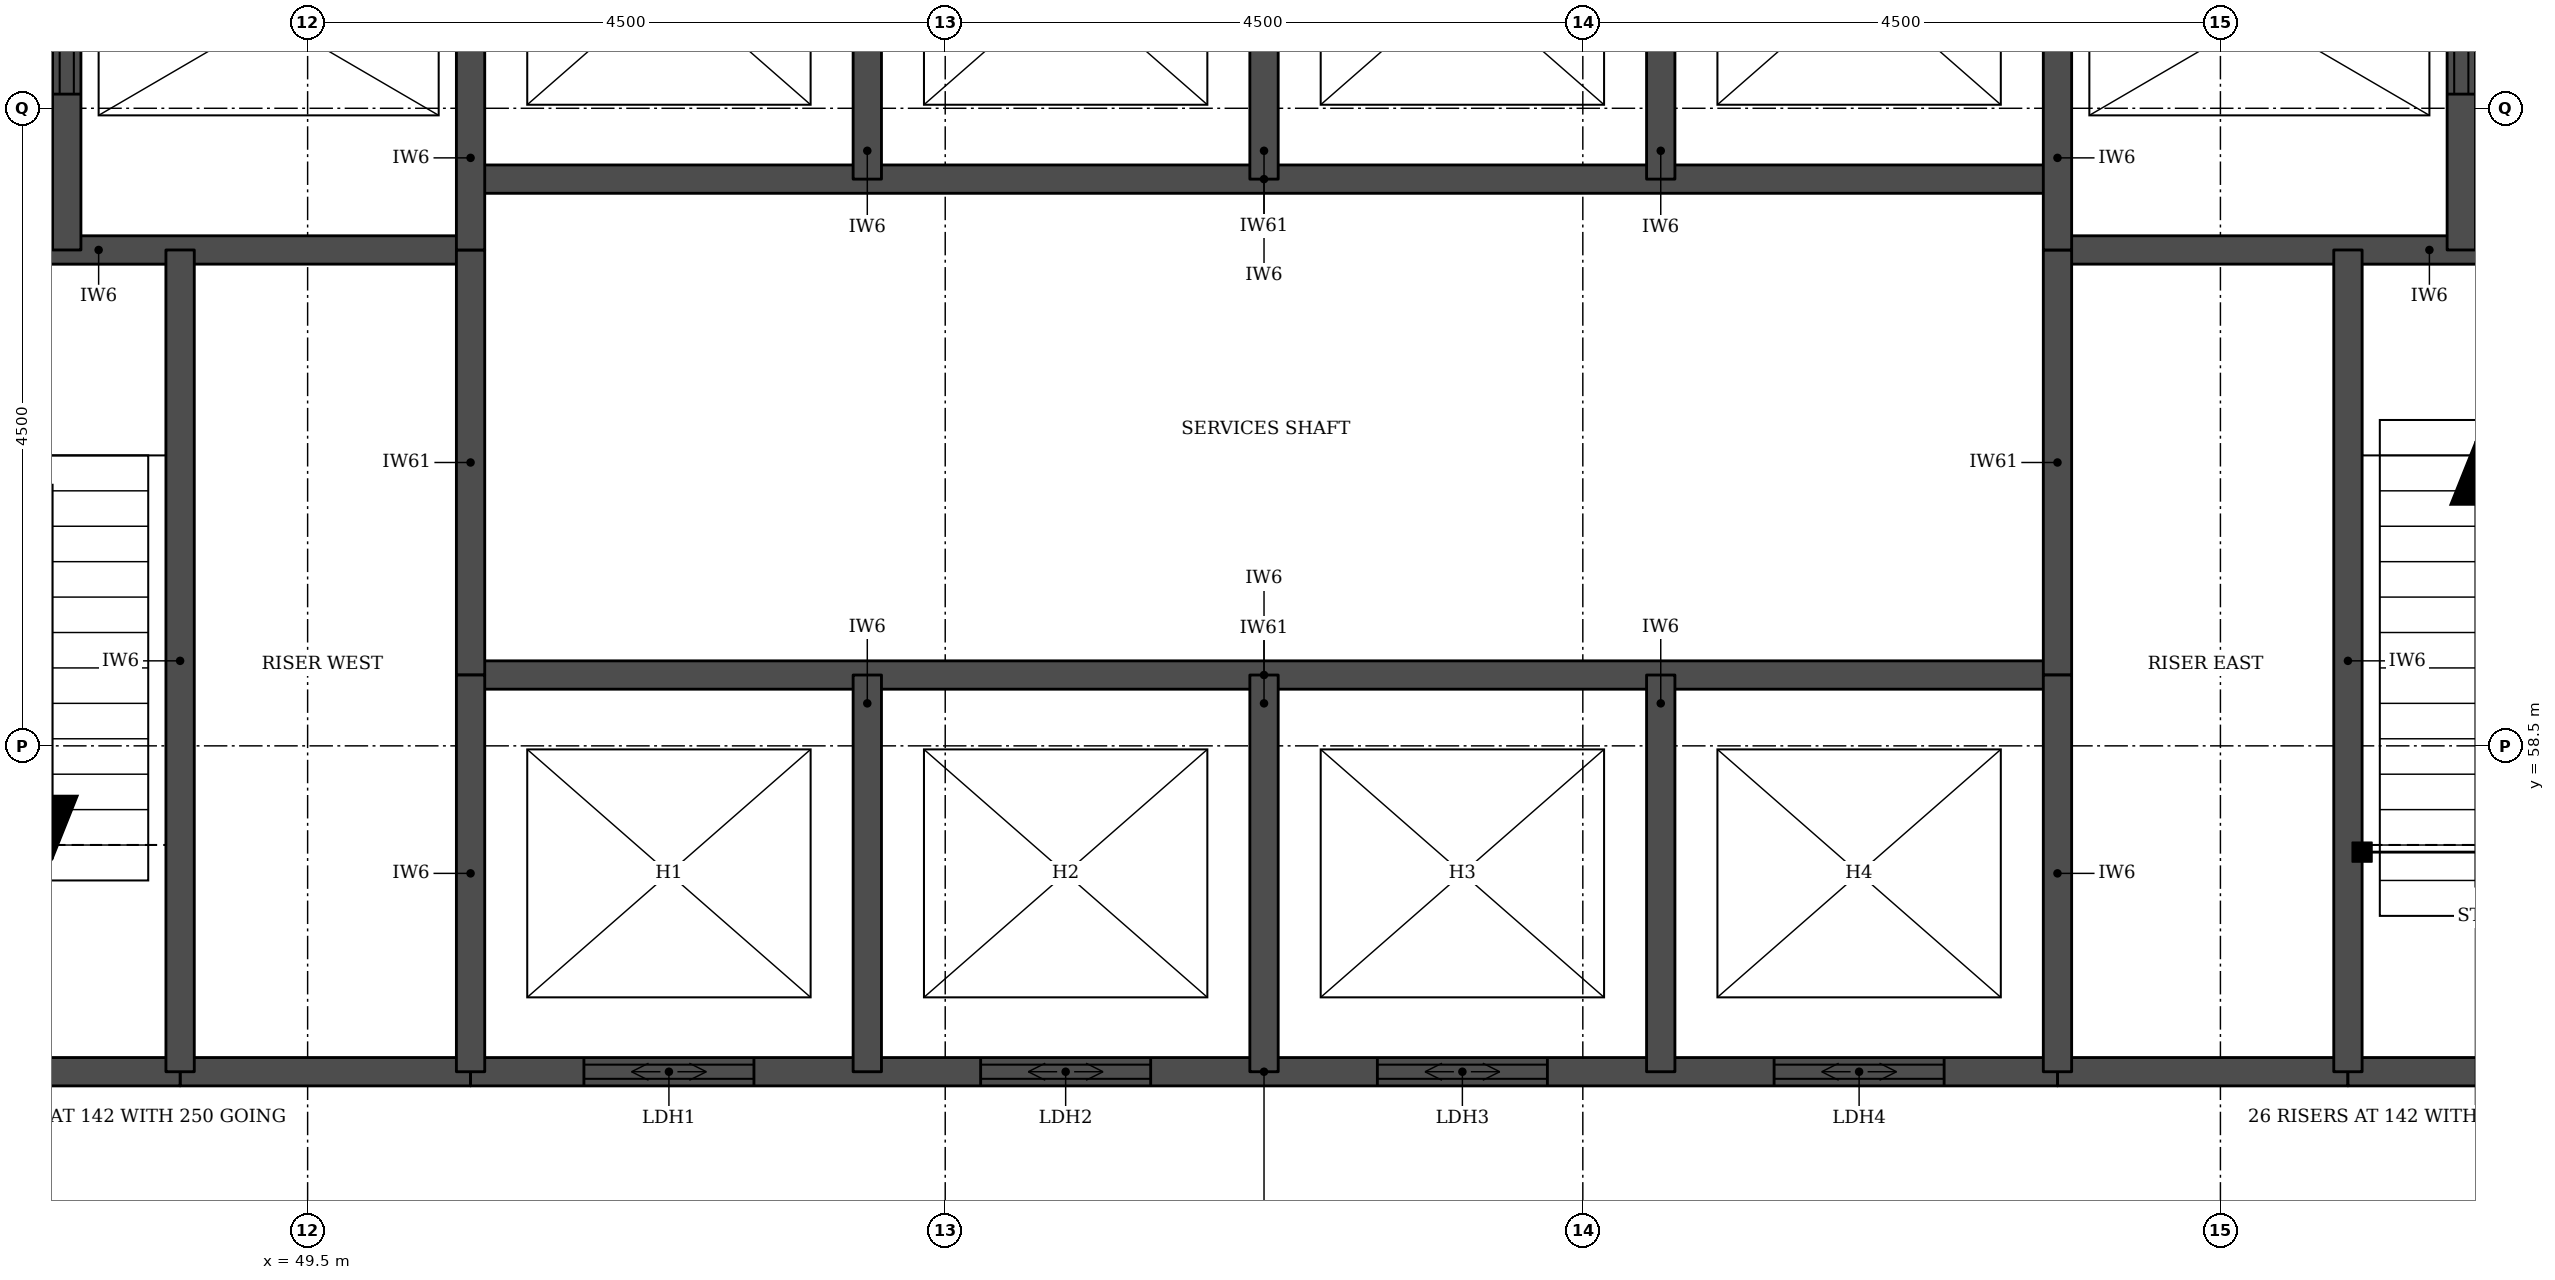
"""IFC4 building model, lengths in metres.
Left out: names, types, materials, properties, quantities, classifications, styles, units other than length and angle.
Written with IfcOpenShell. Run it as: python <this file> out.ifc"""

import sys

from ifc_helpers import new_model, si_unit, direction, frame, frame_2d, origin, place, context, subcontext, project, spatial, rectangle, extrude, element, fill, save


model = new_model("IFC4")
c1 = context("Model", 3, precision=1e-05, world=origin(), true_north=direction((0.0, 1.0)))
c2 = subcontext(c1, "Body", "Model", "MODEL_VIEW")
j1 = project(units=[si_unit("LENGTHUNIT", "METRE"), si_unit("PLANEANGLEUNIT", "RADIAN")], contexts=[c1])
p1 = place(None, origin())
s1 = spatial("IfcSite", under=j1, at=p1, CompositionType="ELEMENT")
p2 = place(p1, origin())
s2 = spatial("IfcBuilding", under=s1, at=p2, CompositionType="ELEMENT")
p3 = place(p2, frame((0.0, 0.0, 173.6)))
s3 = spatial("IfcBuildingStorey", under=s2, at=p3, CompositionType="ELEMENT", Elevation=173.6)
for number, where, z_axis, x_axis in (
    (1, (48.6, 56.2, 0.0), (0.0, 0.0, 1.0), (1.0, 0.0, 0.0)),
    (2, (61.85, 56.2, 0.0), (0.0, 0.0, 1.0), (1.0, 0.0, 0.0)),
):
    element("IfcWall", number, at=place(p3, frame(where, z_axis=z_axis, x_axis=x_axis)), inside=s3, PredefinedType="SOLIDWALL", context=c2, shape_type="SweptSolid", body=[
        extrude(rectangle(XDim=2.05, YDim=0.2, at=frame_2d((1.025, 0.0))), origin(), (0.0, 0.0, 1.0), 3.55),
    ])
p4 = place(p3, frame((45.4, 56.2, 0.0), z_axis=(0.0, 0.0, 1.0), x_axis=(1.0, 0.0, 0.0)))
e3 = element("IfcWall", 3, at=p4, inside=s3, PredefinedType="SOLIDWALL", context=c2, shape_type="SweptSolid", body=[
    extrude(rectangle(XDim=3.2, YDim=0.2, at=frame_2d((1.6, 0.0))), origin(), (0.0, 0.0, 1.0), 3.55),
])
p5 = place(p3, frame((50.65, 56.2, 0.0), z_axis=(0.0, 0.0, 1.0), x_axis=(1.0, 0.0, 0.0)))
e4 = element("IfcWall", 4, at=p5, inside=s3, PredefinedType="SOLIDWALL", context=c2, shape_type="SweptSolid", body=[
    extrude(rectangle(XDim=11.2, YDim=0.2, at=frame_2d((5.6, 0.0))), origin(), (0.0, 0.0, 1.0), 3.55),
])
p6 = place(p5, frame((0.8, 0.0, 0.0)))
e5 = element("IfcOpeningElement", 5, at=p6, cuts=e4, PredefinedType="OPENING", context=c2, shape_type="SweptSolid", body=[
    extrude(rectangle(XDim=1.2, YDim=2.1, at=frame_2d((0.6, 1.05))), frame((0.0, 0.11, 0.0), z_axis=(0.0, -1.0, 0.0), x_axis=(1.0, 0.0, 0.0)), (0.0, 0.0, 1.0), 0.22),
])
p7 = place(p5, frame((3.6, 0.0, 0.0)))
e6 = element("IfcOpeningElement", 6, at=p7, cuts=e4, PredefinedType="OPENING", context=c2, shape_type="SweptSolid", body=[
    extrude(rectangle(XDim=1.2, YDim=2.1, at=frame_2d((0.6, 1.05))), frame((0.0, 0.11, 0.0), z_axis=(0.0, -1.0, 0.0), x_axis=(1.0, 0.0, 0.0)), (0.0, 0.0, 1.0), 0.22),
])
p8 = place(p5, frame((6.4, 0.0, 0.0)))
e7 = element("IfcOpeningElement", 7, at=p8, cuts=e4, PredefinedType="OPENING", context=c2, shape_type="SweptSolid", body=[
    extrude(rectangle(XDim=1.2, YDim=2.1, at=frame_2d((0.6, 1.05))), frame((0.0, 0.11, 0.0), z_axis=(0.0, -1.0, 0.0), x_axis=(1.0, 0.0, 0.0)), (0.0, 0.0, 1.0), 0.22),
])
p9 = place(p5, frame((9.2, 0.0, 0.0)))
e8 = element("IfcOpeningElement", 8, at=p9, cuts=e4, PredefinedType="OPENING", context=c2, shape_type="SweptSolid", body=[
    extrude(rectangle(XDim=1.2, YDim=2.1, at=frame_2d((0.6, 1.05))), frame((0.0, 0.11, 0.0), z_axis=(0.0, -1.0, 0.0), x_axis=(1.0, 0.0, 0.0)), (0.0, 0.0, 1.0), 0.22),
])
p10 = place(p3, frame((63.9, 56.2, 0.0), z_axis=(0.0, 0.0, 1.0), x_axis=(1.0, 0.0, 0.0)))
e9 = element("IfcWall", 9, at=p10, inside=s3, PredefinedType="SOLIDWALL", context=c2, shape_type="SweptSolid", body=[
    extrude(rectangle(XDim=3.2, YDim=0.2, at=frame_2d((1.6, 0.0))), origin(), (0.0, 0.0, 1.0), 3.55),
])
p11 = place(p3, frame((50.65, 59.0, 0.0), z_axis=(0.0, 0.0, 1.0), x_axis=(1.0, 0.0, 0.0)))
e10 = element("IfcWall", 10, at=p11, inside=s3, PredefinedType="SOLIDWALL", context=c2, shape_type="SweptSolid", body=[
    extrude(rectangle(XDim=11.2, YDim=0.2, at=frame_2d((5.6, 0.0))), origin(), (0.0, 0.0, 1.0), 3.7),
])
for number, where, z_axis, x_axis in (
    (11, (45.4, 62.0, 0.0), (0.0, 0.0, 1.0), (1.0, 0.0, 0.0)),
    (12, (61.85, 62.0, 0.0), (0.0, 0.0, 1.0), (1.0, 0.0, 0.0)),
):
    element("IfcWall", number, at=place(p3, frame(where, z_axis=z_axis, x_axis=x_axis)), inside=s3, PredefinedType="SOLIDWALL", context=c2, shape_type="SweptSolid", body=[
        extrude(rectangle(XDim=5.25, YDim=0.2, at=frame_2d((2.625, 0.0))), origin(), (0.0, 0.0, 1.0), 3.55),
    ])
p12 = place(p3, frame((50.65, 62.5, 0.0), z_axis=(0.0, 0.0, 1.0), x_axis=(1.0, 0.0, 0.0)))
e13 = element("IfcWall", 13, at=p12, inside=s3, PredefinedType="SOLIDWALL", context=c2, shape_type="SweptSolid", body=[
    extrude(rectangle(XDim=11.2, YDim=0.2, at=frame_2d((5.6, 0.0))), origin(), (0.0, 0.0, 1.0), 3.7),
])
p13 = place(p3, frame((47.8, 62.0, 0.0), z_axis=(0.0, 0.0, 1.0), x_axis=(0.0, 1.0, 0.0)))
e14 = element("IfcWall", 14, at=p13, inside=s3, PredefinedType="SOLIDWALL", context=c2, shape_type="SweptSolid", body=[
    extrude(rectangle(XDim=3.3, YDim=0.2, at=frame_2d((1.65, 0.0))), origin(), (0.0, 0.0, 1.0), 3.55),
])
p14 = place(p13, frame((1.1, 0.0, 0.0)))
e15 = element("IfcOpeningElement", 15, at=p14, cuts=e14, PredefinedType="OPENING", context=c2, shape_type="SweptSolid", body=[
    extrude(rectangle(XDim=1.1, YDim=2.1, at=frame_2d((0.55, 1.05))), frame((0.0, 0.11, 0.0), z_axis=(0.0, -1.0, 0.0), x_axis=(1.0, 0.0, 0.0)), (0.0, 0.0, 1.0), 0.22),
])
p15 = place(p3, frame((48.6, 56.2, 0.0), z_axis=(0.0, 0.0, 1.0), x_axis=(0.0, 1.0, 0.0)))
e16 = element("IfcWall", 16, at=p15, inside=s3, PredefinedType="SOLIDWALL", context=c2, shape_type="SweptSolid", body=[
    extrude(rectangle(XDim=5.8, YDim=0.2, at=frame_2d((2.9, 0.0))), origin(), (0.0, 0.0, 1.0), 3.55),
])
p16 = place(p3, frame((50.65, 59.0, 0.0), z_axis=(0.0, 0.0, 1.0), x_axis=(0.0, 1.0, 0.0)))
e17 = element("IfcWall", 17, at=p16, inside=s3, PredefinedType="SOLIDWALL", context=c2, shape_type="SweptSolid", body=[
    extrude(rectangle(XDim=3.0, YDim=0.2, at=frame_2d((1.5, 0.0))), origin(), (0.0, 0.0, 1.0), 3.7),
])
p17 = place(p3, frame((50.65, 56.2, 0.0), z_axis=(0.0, 0.0, 1.0), x_axis=(0.0, 1.0, 0.0)))
e18 = element("IfcWall", 18, at=p17, inside=s3, PredefinedType="SOLIDWALL", context=c2, shape_type="SweptSolid", body=[
    extrude(rectangle(XDim=2.8, YDim=0.2, at=frame_2d((1.4, 0.0))), origin(), (0.0, 0.0, 1.0), 3.55),
])
p18 = place(p3, frame((50.65, 62.0, 0.0), z_axis=(0.0, 0.0, 1.0), x_axis=(0.0, 1.0, 0.0)))
e19 = element("IfcWall", 19, at=p18, inside=s3, PredefinedType="SOLIDWALL", context=c2, shape_type="SweptSolid", body=[
    extrude(rectangle(XDim=3.3, YDim=0.2, at=frame_2d((1.65, 0.0))), origin(), (0.0, 0.0, 1.0), 3.55),
])
for number, where, z_axis, x_axis in (
    (20, (53.45, 56.2, 0.0), (0.0, 0.0, 1.0), (0.0, 1.0, 0.0)),
    (21, (53.45, 62.5, 0.0), (0.0, 0.0, 1.0), (0.0, 1.0, 0.0)),
    (22, (56.25, 56.2, 0.0), (0.0, 0.0, 1.0), (0.0, 1.0, 0.0)),
    (23, (56.25, 62.5, 0.0), (0.0, 0.0, 1.0), (0.0, 1.0, 0.0)),
    (24, (59.05, 56.2, 0.0), (0.0, 0.0, 1.0), (0.0, 1.0, 0.0)),
    (25, (59.05, 62.5, 0.0), (0.0, 0.0, 1.0), (0.0, 1.0, 0.0)),
):
    element("IfcWall", number, at=place(p3, frame(where, z_axis=z_axis, x_axis=x_axis)), inside=s3, PredefinedType="SOLIDWALL", context=c2, shape_type="SweptSolid", body=[
        extrude(rectangle(XDim=2.8, YDim=0.2, at=frame_2d((1.4, 0.0))), origin(), (0.0, 0.0, 1.0), 3.55),
    ])
p19 = place(p3, frame((61.85, 59.0, 0.0), z_axis=(0.0, 0.0, 1.0), x_axis=(0.0, 1.0, 0.0)))
e26 = element("IfcWall", 26, at=p19, inside=s3, PredefinedType="SOLIDWALL", context=c2, shape_type="SweptSolid", body=[
    extrude(rectangle(XDim=3.0, YDim=0.2, at=frame_2d((1.5, 0.0))), origin(), (0.0, 0.0, 1.0), 3.7),
])
p20 = place(p3, frame((61.85, 56.2, 0.0), z_axis=(0.0, 0.0, 1.0), x_axis=(0.0, 1.0, 0.0)))
e27 = element("IfcWall", 27, at=p20, inside=s3, PredefinedType="SOLIDWALL", context=c2, shape_type="SweptSolid", body=[
    extrude(rectangle(XDim=2.8, YDim=0.2, at=frame_2d((1.4, 0.0))), origin(), (0.0, 0.0, 1.0), 3.55),
])
p21 = place(p3, frame((61.85, 62.0, 0.0), z_axis=(0.0, 0.0, 1.0), x_axis=(0.0, 1.0, 0.0)))
e28 = element("IfcWall", 28, at=p21, inside=s3, PredefinedType="SOLIDWALL", context=c2, shape_type="SweptSolid", body=[
    extrude(rectangle(XDim=3.3, YDim=0.2, at=frame_2d((1.65, 0.0))), origin(), (0.0, 0.0, 1.0), 3.55),
])
p22 = place(p3, frame((63.9, 56.2, 0.0), z_axis=(0.0, 0.0, 1.0), x_axis=(0.0, 1.0, 0.0)))
e29 = element("IfcWall", 29, at=p22, inside=s3, PredefinedType="SOLIDWALL", context=c2, shape_type="SweptSolid", body=[
    extrude(rectangle(XDim=5.8, YDim=0.2, at=frame_2d((2.9, 0.0))), origin(), (0.0, 0.0, 1.0), 3.55),
])
p23 = place(p3, frame((64.7, 62.0, 0.0), z_axis=(0.0, 0.0, 1.0), x_axis=(0.0, 1.0, 0.0)))
e30 = element("IfcWall", 30, at=p23, inside=s3, PredefinedType="SOLIDWALL", context=c2, shape_type="SweptSolid", body=[
    extrude(rectangle(XDim=3.3, YDim=0.2, at=frame_2d((1.65, 0.0))), origin(), (0.0, 0.0, 1.0), 3.55),
])
p24 = place(p23, frame((1.1, 0.0, 0.0)))
e31 = element("IfcOpeningElement", 31, at=p24, cuts=e30, PredefinedType="OPENING", context=c2, shape_type="SweptSolid", body=[
    extrude(rectangle(XDim=1.1, YDim=2.1, at=frame_2d((0.55, 1.05))), frame((0.0, 0.11, 0.0), z_axis=(0.0, -1.0, 0.0), x_axis=(1.0, 0.0, 0.0)), (0.0, 0.0, 1.0), 0.22),
])
p25 = place(p6, origin())
e32 = element("IfcDoor", 32, at=p25, inside=s3, OperationType="DOUBLE_DOOR_SLIDING", PredefinedType="DOOR", context=c2, shape_type="SweptSolid", body=[
    extrude(rectangle(XDim=1.2, YDim=2.1, at=frame_2d((0.6, 1.05))), frame((0.0, 0.025, 0.0), z_axis=(0.0, -1.0, 0.0), x_axis=(1.0, 0.0, 0.0)), (0.0, 0.0, 1.0), 0.05),
])
fill(e5, e32)
p26 = place(p7, origin())
e33 = element("IfcDoor", 33, at=p26, inside=s3, OperationType="DOUBLE_DOOR_SLIDING", PredefinedType="DOOR", context=c2, shape_type="SweptSolid", body=[
    extrude(rectangle(XDim=1.2, YDim=2.1, at=frame_2d((0.6, 1.05))), frame((0.0, 0.025, 0.0), z_axis=(0.0, -1.0, 0.0), x_axis=(1.0, 0.0, 0.0)), (0.0, 0.0, 1.0), 0.05),
])
fill(e6, e33)
p27 = place(p8, origin())
e34 = element("IfcDoor", 34, at=p27, inside=s3, OperationType="DOUBLE_DOOR_SLIDING", PredefinedType="DOOR", context=c2, shape_type="SweptSolid", body=[
    extrude(rectangle(XDim=1.2, YDim=2.1, at=frame_2d((0.6, 1.05))), frame((0.0, 0.025, 0.0), z_axis=(0.0, -1.0, 0.0), x_axis=(1.0, 0.0, 0.0)), (0.0, 0.0, 1.0), 0.05),
])
fill(e7, e34)
p28 = place(p9, origin())
e35 = element("IfcDoor", 35, at=p28, inside=s3, OperationType="DOUBLE_DOOR_SLIDING", PredefinedType="DOOR", context=c2, shape_type="SweptSolid", body=[
    extrude(rectangle(XDim=1.2, YDim=2.1, at=frame_2d((0.6, 1.05))), frame((0.0, 0.025, 0.0), z_axis=(0.0, -1.0, 0.0), x_axis=(1.0, 0.0, 0.0)), (0.0, 0.0, 1.0), 0.05),
])
fill(e8, e35)
p29 = place(p14, origin())
e36 = element("IfcDoor", 36, at=p29, inside=s3, OperationType="DOUBLE_DOOR_SLIDING", PredefinedType="DOOR", context=c2, shape_type="SweptSolid", body=[
    extrude(rectangle(XDim=1.1, YDim=2.1, at=frame_2d((0.55, 1.05))), frame((0.0, 0.025, 0.0), z_axis=(0.0, -1.0, 0.0), x_axis=(1.0, 0.0, 0.0)), (0.0, 0.0, 1.0), 0.05),
])
fill(e15, e36)
p30 = place(p24, origin())
e37 = element("IfcDoor", 37, at=p30, inside=s3, OperationType="DOUBLE_DOOR_SLIDING", PredefinedType="DOOR", context=c2, shape_type="SweptSolid", body=[
    extrude(rectangle(XDim=1.1, YDim=2.1, at=frame_2d((0.55, 1.05))), frame((0.0, 0.025, 0.0), z_axis=(0.0, -1.0, 0.0), x_axis=(1.0, 0.0, 0.0)), (0.0, 0.0, 1.0), 0.05),
])
fill(e31, e37)
save(model, sys.argv[1])
